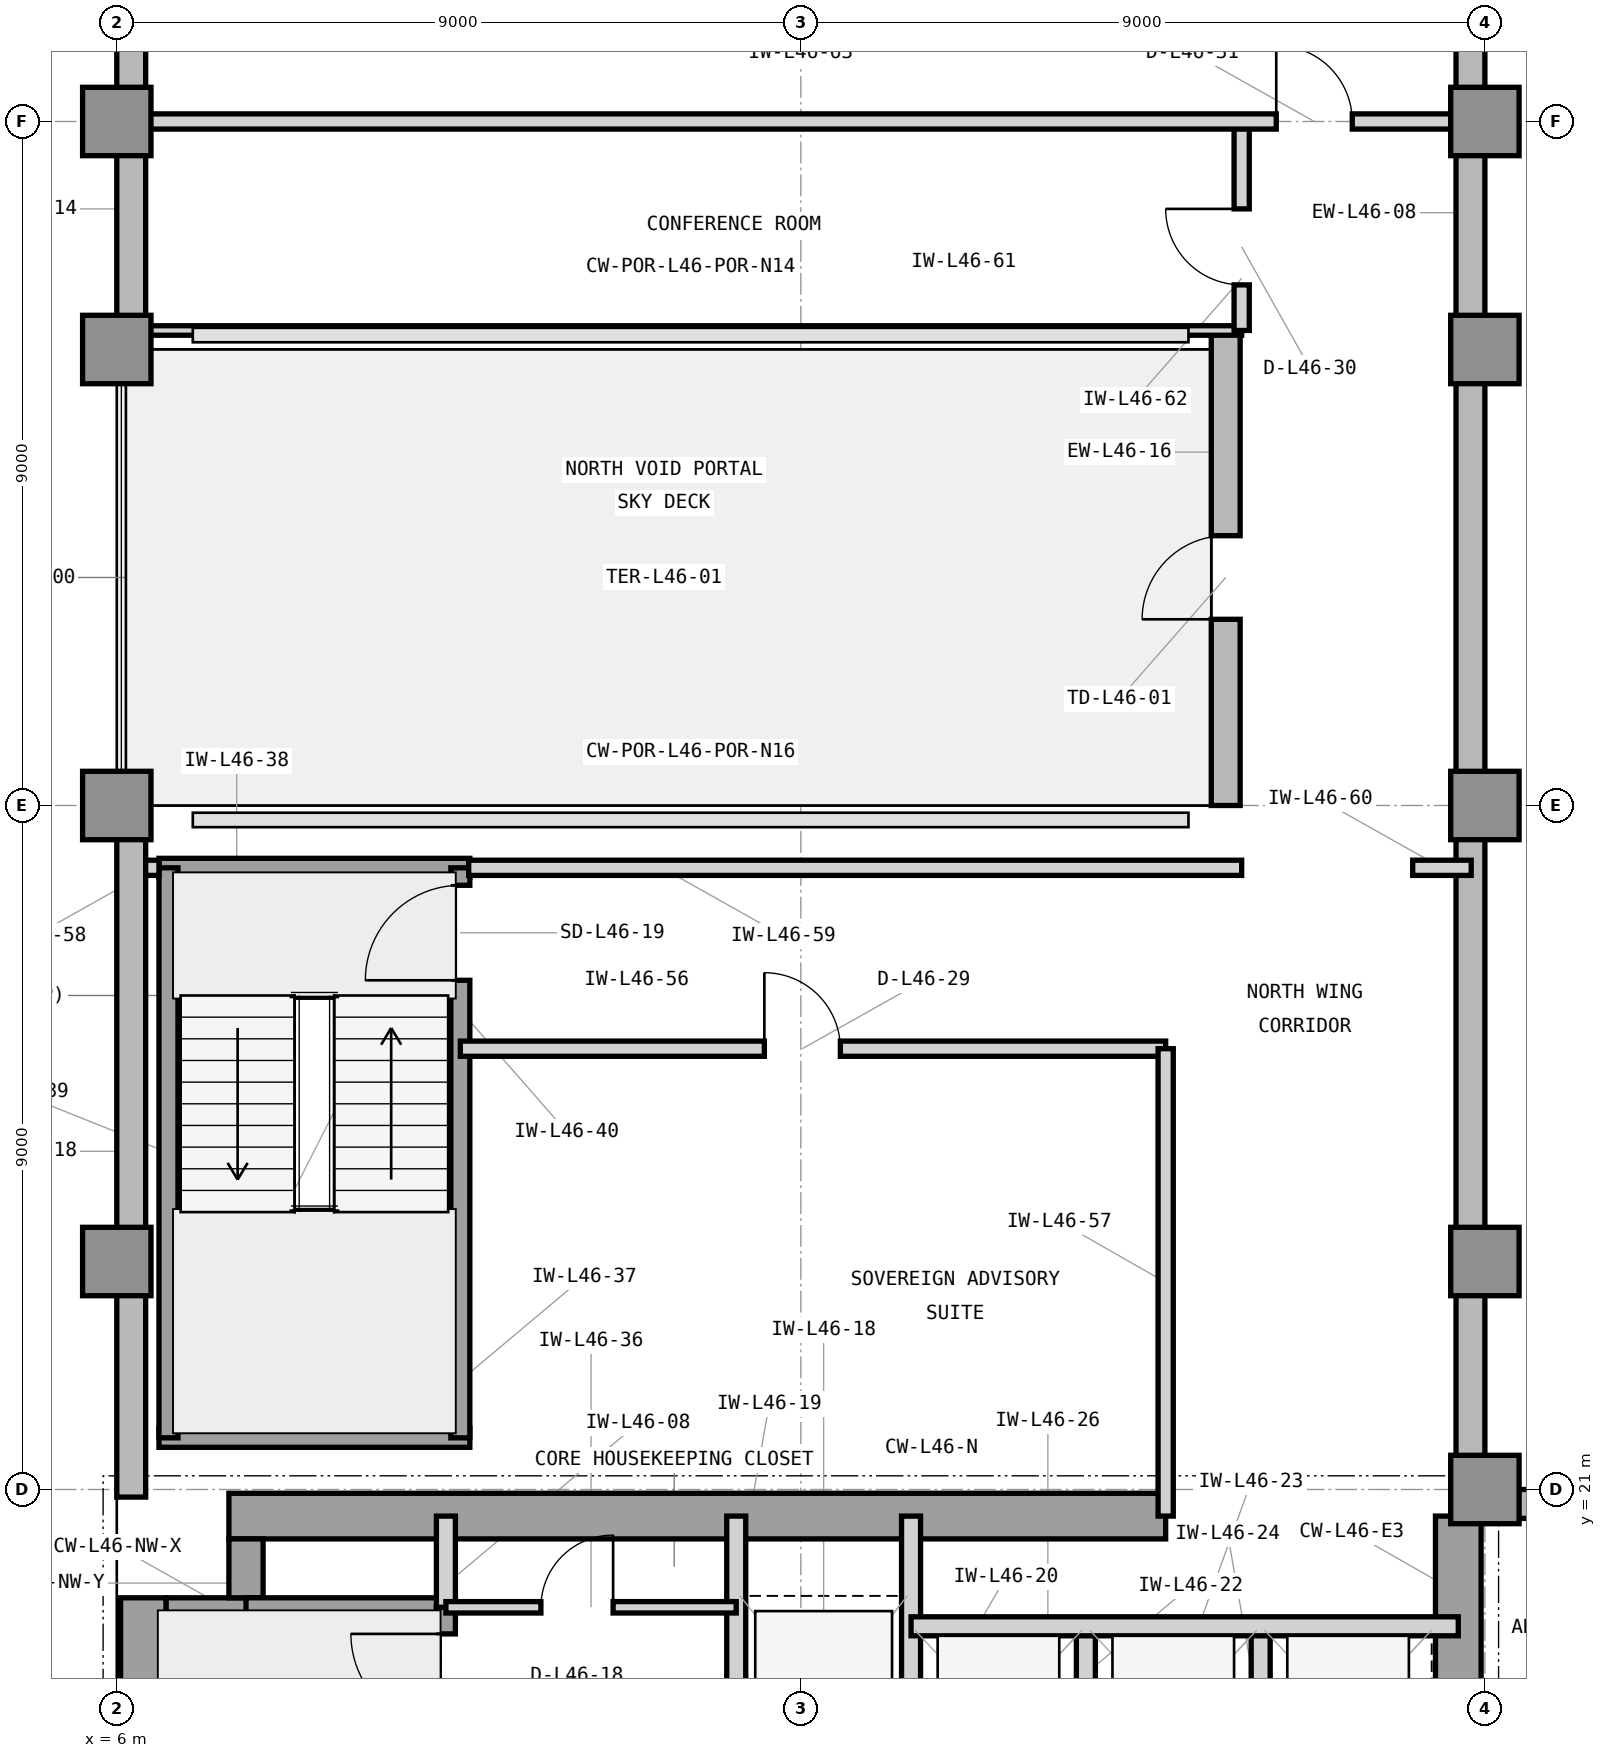
"""IFC4 building model, lengths in metres.
Left out: names, types, materials, properties, quantities, classifications, styles, units other than length and angle.
Written with IfcOpenShell. Run it as: python <this file> out.ifc"""

import sys

from ifc_helpers import new_model, si_unit, direction, frame, frame_2d, origin, origin_2d, place, context, subcontext, project, spatial, rectangle, extrude, element, fill, save


model = new_model("IFC4")
c1 = context("Model", 3, precision=1e-05, world=origin(), true_north=direction((0.0, 1.0)))
c2 = subcontext(c1, "Body", "Model", "MODEL_VIEW")
j1 = project(units=[si_unit("LENGTHUNIT", "METRE"), si_unit("PLANEANGLEUNIT", "RADIAN")], contexts=[c1])
p1 = place(None, origin())
s1 = spatial("IfcSite", under=j1, at=p1, CompositionType="ELEMENT")
p2 = place(p1, origin())
s2 = spatial("IfcBuilding", under=s1, at=p2, CompositionType="ELEMENT")
p3 = place(p2, frame((0.0, 0.0, 191.7)))
s3 = spatial("IfcBuildingStorey", under=s2, at=p3, CompositionType="ELEMENT", Elevation=191.7)
p4 = place(p3, frame((6.35, 4.425, 0.0), z_axis=(0.0, 0.0, 1.0), x_axis=(0.0, 1.0, 0.0)))
e1 = element("IfcWall", 1, at=p4, inside=s3, PredefinedType="SHEAR", context=c2, shape_type="SweptSolid", body=[
    extrude(rectangle(XDim=15.15, YDim=0.6, at=frame_2d((7.575, 0.0))), origin(), (0.0, 0.0, 1.0), 3.9),
])
p5 = place(p3, frame((7.475, 20.65, 0.0), z_axis=(0.0, 0.0, 1.0), x_axis=(1.0, 0.0, 0.0)))
e2 = element("IfcWall", 2, at=p5, inside=s3, PredefinedType="SHEAR", context=c2, shape_type="SweptSolid", body=[
    extrude(rectangle(XDim=12.325, YDim=0.6, at=frame_2d((6.163, 0.0))), origin(), (0.0, 0.0, 1.0), 3.9),
])
p6 = place(p3, frame((23.65, 16.6, 0.0), z_axis=(0.0, 0.0, 1.0), x_axis=(0.0, 1.0, 0.0)))
e3 = element("IfcWall", 3, at=p6, inside=s3, PredefinedType="SHEAR", context=c2, shape_type="SweptSolid", body=[
    extrude(rectangle(XDim=4.05, YDim=0.6, at=frame_2d((2.025, 0.0))), origin(), (0.0, 0.0, 1.0), 3.9),
])
p7 = place(p3, frame((6.65, 19.35, 0.0), z_axis=(0.0, 0.0, 1.0), x_axis=(1.0, 0.0, 0.0)))
e4 = element("IfcWall", 4, at=p7, inside=s3, PredefinedType="SHEAR", context=c2, shape_type="SweptSolid", body=[
    extrude(rectangle(XDim=1.275, YDim=0.45, at=frame_2d((0.638, 0.0))), origin(), (0.0, 0.0, 1.0), 3.9),
])
p8 = place(p3, frame((7.7, 19.575, 0.0), z_axis=(0.0, 0.0, 1.0), x_axis=(0.0, 1.0, 0.0)))
e5 = element("IfcWall", 5, at=p8, inside=s3, PredefinedType="SHEAR", context=c2, shape_type="SweptSolid", body=[
    extrude(rectangle(XDim=0.775, YDim=0.45, at=frame_2d((0.388, 0.0))), origin(), (0.0, 0.0, 1.0), 3.9),
])
for number, where, z_axis, x_axis in (
    (6, (24.0, 21.0, 0.0), (0.0, 0.0, 1.0), (1.0, 0.0, 0.0)),
    (7, (6.0, 24.0, 0.0), (0.0, 0.0, 1.0), (1.0, 0.0, 0.0)),
    (8, (24.0, 24.0, 0.0), (0.0, 0.0, 1.0), (1.0, 0.0, 0.0)),
    (9, (6.0, 30.0, 0.0), (0.0, 0.0, 1.0), (1.0, 0.0, 0.0)),
    (10, (24.0, 30.0, 0.0), (0.0, 0.0, 1.0), (1.0, 0.0, 0.0)),
    (11, (6.0, 36.0, 0.0), (0.0, 0.0, 1.0), (1.0, 0.0, 0.0)),
    (12, (24.0, 36.0, 0.0), (0.0, 0.0, 1.0), (1.0, 0.0, 0.0)),
    (13, (6.0, 39.0, 0.0), (0.0, 0.0, 1.0), (1.0, 0.0, 0.0)),
    (14, (24.0, 39.0, 0.0), (0.0, 0.0, 1.0), (1.0, 0.0, 0.0)),
):
    element("IfcColumn", number, at=place(p3, frame(where, z_axis=z_axis, x_axis=x_axis)), inside=s3, PredefinedType="COLUMN", context=c2, shape_type="SweptSolid", body=[
        extrude(rectangle(XDim=0.9, YDim=0.9, at=origin_2d()), origin(), (0.0, 0.0, 1.0), 3.9),
    ])
p9 = place(p3, frame((55.4, 20.81, 0.0), z_axis=(0.0, 0.0, 1.0), x_axis=(-1.0, 0.0, 0.0)))
e15 = element("IfcWall", 15, at=p9, inside=s3, PredefinedType="STANDARD", context=c2, shape_type="SweptSolid", body=[
    extrude(rectangle(XDim=31.4, YDim=0.38, at=frame_2d((15.7, 0.0))), origin(), (0.0, 0.0, 1.0), 3.7),
])
p10 = place(p9, frame((17.167, 0.0, 0.9)))
e16 = element("IfcOpeningElement", 16, at=p10, cuts=e15, PredefinedType="OPENING", context=c2, shape_type="SweptSolid", body=[
    extrude(rectangle(XDim=2.3, YDim=2.2, at=frame_2d((1.15, 1.1))), frame((0.0, 0.2, 0.0), z_axis=(0.0, -1.0, 0.0), x_axis=(1.0, 0.0, 0.0)), (0.0, 0.0, 1.0), 0.4),
])
p11 = place(p9, frame((29.034, 0.0, 0.9)))
e17 = element("IfcOpeningElement", 17, at=p11, cuts=e15, PredefinedType="OPENING", context=c2, shape_type="SweptSolid", body=[
    extrude(rectangle(XDim=1.6, YDim=2.2, at=frame_2d((0.8, 1.1))), frame((0.0, 0.2, 0.0), z_axis=(0.0, -1.0, 0.0), x_axis=(1.0, 0.0, 0.0)), (0.0, 0.0, 1.0), 0.4),
])
p12 = place(p9, frame((8.354, 0.0, 0.9)))
e18 = element("IfcOpeningElement", 18, at=p12, cuts=e15, PredefinedType="OPENING", context=c2, shape_type="SweptSolid", body=[
    extrude(rectangle(XDim=2.3, YDim=2.2, at=frame_2d((1.15, 1.1))), frame((0.0, 0.2, 0.0), z_axis=(0.0, -1.0, 0.0), x_axis=(1.0, 0.0, 0.0)), (0.0, 0.0, 1.0), 0.4),
])
p13 = place(p3, frame((23.81, 21.0, 0.0), z_axis=(0.0, 0.0, 1.0), x_axis=(0.0, 1.0, 0.0)))
e19 = element("IfcWall", 19, at=p13, inside=s3, PredefinedType="STANDARD", context=c2, shape_type="SweptSolid", body=[
    extrude(rectangle(XDim=22.4, YDim=0.38, at=frame_2d((11.2, 0.0))), origin(), (0.0, 0.0, 1.0), 3.7),
])
p14 = place(p3, frame((6.19, 43.4, 0.0), z_axis=(0.0, 0.0, 1.0), x_axis=(0.0, -1.0, 0.0)))
e20 = element("IfcWall", 20, at=p14, inside=s3, PredefinedType="STANDARD", context=c2, shape_type="SweptSolid", body=[
    extrude(rectangle(XDim=7.4, YDim=0.38, at=frame_2d((3.7, 0.0))), origin(), (0.0, 0.0, 1.0), 3.7),
])
p15 = place(p3, frame((20.59, 36.2, 0.0), z_axis=(0.0, 0.0, 1.0), x_axis=(0.0, -1.0, 0.0)))
e21 = element("IfcWall", 21, at=p15, inside=s3, PredefinedType="STANDARD", context=c2, shape_type="SweptSolid", body=[
    extrude(rectangle(XDim=6.2, YDim=0.38, at=frame_2d((3.1, 0.0))), origin(), (0.0, 0.0, 1.0), 3.7),
])
p16 = place(p15, frame((2.65, 0.0, 0.0)))
e22 = element("IfcOpeningElement", 22, at=p16, cuts=e21, PredefinedType="OPENING", context=c2, shape_type="SweptSolid", body=[
    extrude(rectangle(XDim=1.1, YDim=2.3, at=frame_2d((0.55, 1.15))), frame((0.0, 0.2, 0.0), z_axis=(0.0, -1.0, 0.0), x_axis=(1.0, 0.0, 0.0)), (0.0, 0.0, 1.0), 0.4),
])
p17 = place(p3, frame((6.19, 30.0, 0.0), z_axis=(0.0, 0.0, 1.0), x_axis=(0.0, -1.0, 0.0)))
e23 = element("IfcWall", 23, at=p17, inside=s3, PredefinedType="STANDARD", context=c2, shape_type="SweptSolid", body=[
    extrude(rectangle(XDim=9.1, YDim=0.38, at=frame_2d((4.55, 0.0))), origin(), (0.0, 0.0, 1.0), 3.7),
])
p18 = place(p3, frame((7.7, 19.45, 0.0), z_axis=(0.0, 0.0, 1.0), x_axis=(1.0, 0.0, 0.0)))
e24 = element("IfcWall", 24, at=p18, inside=s3, PredefinedType="SHEAR", context=c2, shape_type="SweptSolid", body=[
    extrude(rectangle(XDim=2.755, YDim=0.25, at=frame_2d((1.377, 0.0))), origin(), (0.0, 0.0, 1.0), 3.9),
])
p19 = place(p3, frame((10.33, 12.0, 0.0), z_axis=(0.0, 0.0, 1.0), x_axis=(0.0, 1.0, 0.0)))
e25 = element("IfcWall", 25, at=p19, inside=s3, PredefinedType="SHEAR", context=c2, shape_type="SweptSolid", body=[
    extrude(rectangle(XDim=7.45, YDim=0.25, at=frame_2d((3.725, 0.0))), origin(), (0.0, 0.0, 1.0), 3.9),
])
p20 = place(p19, frame((5.85, 0.0, 0.0)))
e26 = element("IfcOpeningElement", 26, at=p20, cuts=e25, PredefinedType="OPENING", context=c2, shape_type="SweptSolid", body=[
    extrude(rectangle(XDim=1.25, YDim=2.2, at=frame_2d((0.625, 1.1))), frame((0.0, 0.135, 0.0), z_axis=(0.0, -1.0, 0.0), x_axis=(1.0, 0.0, 0.0)), (0.0, 0.0, 1.0), 0.27),
])
p21 = place(p3, frame((10.33, 19.45, 0.0), z_axis=(0.0, 0.0, 1.0), x_axis=(0.0, 1.0, 0.0)))
e27 = element("IfcWall", 27, at=p21, inside=s3, PredefinedType="PARTITIONING", context=c2, shape_type="SweptSolid", body=[
    extrude(rectangle(XDim=1.2, YDim=0.25, at=frame_2d((0.6, 0.0))), origin(), (0.0, 0.0, 1.0), 3.073),
])
for number, where, z_axis, x_axis in (
    (28, (14.15, 16.7, 0.0), (0.0, 0.0, 1.0), (0.0, 1.0, 0.0)),
    (29, (16.45, 16.7, 0.0), (0.0, 0.0, 1.0), (0.0, 1.0, 0.0)),
):
    element("IfcWall", number, at=place(p3, frame(where, z_axis=z_axis, x_axis=x_axis)), inside=s3, PredefinedType="PARTITIONING", context=c2, shape_type="SweptSolid", body=[
        extrude(rectangle(XDim=3.95, YDim=0.25, at=frame_2d((1.975, 0.0))), origin(), (0.0, 0.0, 1.0), 3.69),
    ])
for number, where, z_axis, x_axis in (
    (30, (18.75, 16.7, 0.0), (0.0, 0.0, 1.0), (0.0, 1.0, 0.0)),
    (31, (21.05, 16.7, 0.0), (0.0, 0.0, 1.0), (0.0, 1.0, 0.0)),
):
    element("IfcWall", number, at=place(p3, frame(where, z_axis=z_axis, x_axis=x_axis)), inside=s3, PredefinedType="PARTITIONING", context=c2, shape_type="SweptSolid", body=[
        extrude(rectangle(XDim=2.5, YDim=0.25, at=frame_2d((1.25, 0.0))), origin(), (0.0, 0.0, 1.0), 3.69),
    ])
p22 = place(p3, frame((16.45, 19.2, 0.0), z_axis=(0.0, 0.0, 1.0), x_axis=(1.0, 0.0, 0.0)))
e32 = element("IfcWall", 32, at=p22, inside=s3, PredefinedType="PARTITIONING", context=c2, shape_type="SweptSolid", body=[
    extrude(rectangle(XDim=7.2, YDim=0.25, at=frame_2d((3.6, 0.0))), origin(), (0.0, 0.0, 1.0), 3.69),
])
p23 = place(p3, frame((10.33, 19.45, 0.0), z_axis=(0.0, 0.0, 1.0), x_axis=(1.0, 0.0, 0.0)))
e33 = element("IfcWall", 33, at=p23, inside=s3, PredefinedType="PARTITIONING", context=c2, shape_type="SweptSolid", body=[
    extrude(rectangle(XDim=3.82, YDim=0.15, at=frame_2d((1.91, 0.0))), origin(), (0.0, 0.0, 1.0), 3.69),
])
p24 = place(p23, frame((1.25, 0.0, 0.0)))
e34 = element("IfcOpeningElement", 34, at=p24, cuts=e33, PredefinedType="OPENING", context=c2, shape_type="SweptSolid", body=[
    extrude(rectangle(XDim=0.95, YDim=2.1, at=frame_2d((0.475, 1.05))), frame((0.0, 0.085, 0.0), z_axis=(0.0, -1.0, 0.0), x_axis=(1.0, 0.0, 0.0)), (0.0, 0.0, 1.0), 0.17),
])
for number, where, z_axis, x_axis in (
    (35, (6.555, 21.68, 0.0), (0.0, 0.0, 1.0), (1.0, 0.0, 0.0)),
    (36, (6.555, 29.18, 0.0), (0.0, 0.0, 1.0), (1.0, 0.0, 0.0)),
):
    element("IfcWall", number, at=place(p3, frame(where, z_axis=z_axis, x_axis=x_axis)), inside=s3, PredefinedType="SHEAR", context=c2, shape_type="SweptSolid", body=[
        extrude(rectangle(XDim=4.09, YDim=0.25, at=frame_2d((2.045, 0.0))), origin(), (0.0, 0.0, 1.0), 3.9),
    ])
p25 = place(p3, frame((6.68, 21.68, 0.0), z_axis=(0.0, 0.0, 1.0), x_axis=(0.0, 1.0, 0.0)))
e37 = element("IfcWall", 37, at=p25, inside=s3, PredefinedType="SHEAR", context=c2, shape_type="SweptSolid", body=[
    extrude(rectangle(XDim=7.5, YDim=0.25, at=frame_2d((3.75, 0.0))), origin(), (0.0, 0.0, 1.0), 3.9),
])
p26 = place(p3, frame((10.52, 21.68, 0.0), z_axis=(0.0, 0.0, 1.0), x_axis=(0.0, 1.0, 0.0)))
e38 = element("IfcWall", 38, at=p26, inside=s3, PredefinedType="SHEAR", context=c2, shape_type="SweptSolid", body=[
    extrude(rectangle(XDim=7.5, YDim=0.25, at=frame_2d((3.75, 0.0))), origin(), (0.0, 0.0, 1.0), 3.9),
])
p27 = place(p26, frame((6.02, 0.0, 0.0)))
e39 = element("IfcOpeningElement", 39, at=p27, cuts=e38, PredefinedType="OPENING", context=c2, shape_type="SweptSolid", body=[
    extrude(rectangle(XDim=1.25, YDim=2.2, at=frame_2d((0.625, 1.1))), frame((0.0, 0.135, 0.0), z_axis=(0.0, -1.0, 0.0), x_axis=(1.0, 0.0, 0.0)), (0.0, 0.0, 1.0), 0.27),
])
p28 = place(p3, frame((10.52, 26.8, 0.0), z_axis=(0.0, 0.0, 1.0), x_axis=(1.0, 0.0, 0.0)))
e40 = element("IfcWall", 40, at=p28, inside=s3, PredefinedType="PARTITIONING", context=c2, shape_type="SweptSolid", body=[
    extrude(rectangle(XDim=9.28, YDim=0.2, at=frame_2d((4.64, 0.0))), origin(), (0.0, 0.0, 1.0), 3.69),
])
p29 = place(p28, frame((4.0, 0.0, 0.0)))
e41 = element("IfcOpeningElement", 41, at=p29, cuts=e40, PredefinedType="OPENING", context=c2, shape_type="SweptSolid", body=[
    extrude(rectangle(XDim=1.0, YDim=2.15, at=frame_2d((0.5, 1.075))), frame((0.0, 0.11, 0.0), z_axis=(0.0, -1.0, 0.0), x_axis=(1.0, 0.0, 0.0)), (0.0, 0.0, 1.0), 0.22),
])
p30 = place(p3, frame((19.8, 20.65, 0.0), z_axis=(0.0, 0.0, 1.0), x_axis=(0.0, 1.0, 0.0)))
e42 = element("IfcWall", 42, at=p30, inside=s3, PredefinedType="PARTITIONING", context=c2, shape_type="SweptSolid", body=[
    extrude(rectangle(XDim=6.15, YDim=0.2, at=frame_2d((3.075, 0.0))), origin(), (0.0, 0.0, 1.0), 3.69),
])
p31 = place(p3, frame((6.38, 29.18, 0.0), z_axis=(0.0, 0.0, 1.0), x_axis=(1.0, 0.0, 0.0)))
e43 = element("IfcWall", 43, at=p31, inside=s3, PredefinedType="PARTITIONING", context=c2, shape_type="SweptSolid", body=[
    extrude(rectangle(XDim=0.175, YDim=0.2, at=frame_2d((0.087, 0.0))), origin(), (0.0, 0.0, 1.0), 3.69),
])
p32 = place(p3, frame((10.63, 29.18, 0.0), z_axis=(0.0, 0.0, 1.0), x_axis=(1.0, 0.0, 0.0)))
e44 = element("IfcWall", 44, at=p32, inside=s3, PredefinedType="PARTITIONING", context=c2, shape_type="SweptSolid", body=[
    extrude(rectangle(XDim=10.17, YDim=0.2, at=frame_2d((5.085, 0.0))), origin(), (0.0, 0.0, 1.0), 3.69),
])
p33 = place(p3, frame((23.05, 29.18, 0.0), z_axis=(0.0, 0.0, 1.0), x_axis=(1.0, 0.0, 0.0)))
e45 = element("IfcWall", 45, at=p33, inside=s3, PredefinedType="PARTITIONING", context=c2, shape_type="SweptSolid", body=[
    extrude(rectangle(XDim=0.77, YDim=0.2, at=frame_2d((0.385, 0.0))), origin(), (0.0, 0.0, 1.0), 3.69),
])
p34 = place(p3, frame((6.18, 36.25, 0.0), z_axis=(0.0, 0.0, 1.0), x_axis=(1.0, 0.0, 0.0)))
e46 = element("IfcWall", 46, at=p34, inside=s3, PredefinedType="PARTITIONING", context=c2, shape_type="SweptSolid", body=[
    extrude(rectangle(XDim=14.62, YDim=0.125, at=frame_2d((7.31, 0.0))), origin(), (0.0, 0.0, 1.0), 3.69),
])
p35 = place(p3, frame((20.8, 36.25, 0.0), z_axis=(0.0, 0.0, 1.0), x_axis=(0.0, 1.0, 0.0)))
e47 = element("IfcWall", 47, at=p35, inside=s3, PredefinedType="PARTITIONING", context=c2, shape_type="SweptSolid", body=[
    extrude(rectangle(XDim=2.75, YDim=0.2, at=frame_2d((1.375, 0.0))), origin(), (0.0, 0.0, 1.0), 3.69),
])
p36 = place(p35, frame((0.6, 0.0, 0.0)))
e48 = element("IfcOpeningElement", 48, at=p36, cuts=e47, PredefinedType="OPENING", context=c2, shape_type="SweptSolid", body=[
    extrude(rectangle(XDim=1.0, YDim=2.15, at=frame_2d((0.5, 1.075))), frame((0.0, 0.11, 0.0), z_axis=(0.0, -1.0, 0.0), x_axis=(1.0, 0.0, 0.0)), (0.0, 0.0, 1.0), 0.22),
])
p37 = place(p3, frame((6.18, 39.0, 0.0), z_axis=(0.0, 0.0, 1.0), x_axis=(1.0, 0.0, 0.0)))
e49 = element("IfcWall", 49, at=p37, inside=s3, PredefinedType="PARTITIONING", context=c2, shape_type="SweptSolid", body=[
    extrude(rectangle(XDim=17.64, YDim=0.2, at=frame_2d((8.82, 0.0))), origin(), (0.0, 0.0, 1.0), 3.073),
])
p38 = place(p37, frame((15.075, 0.0, 0.0)))
e50 = element("IfcOpeningElement", 50, at=p38, cuts=e49, PredefinedType="OPENING", context=c2, shape_type="SweptSolid", body=[
    extrude(rectangle(XDim=1.0, YDim=2.15, at=frame_2d((0.5, 1.075))), frame((0.0, 0.11, 0.0), z_axis=(0.0, -1.0, 0.0), x_axis=(1.0, 0.0, 0.0)), (0.0, 0.0, 1.0), 0.22),
])
p39 = place(p16, frame((1.1, 0.0, 0.0), z_axis=(0.0, 0.0, 1.0), x_axis=(-1.0, 0.0, 0.0)))
e51 = element("IfcDoor", 51, at=p39, inside=s3, OperationType="SINGLE_SWING_LEFT", PredefinedType="DOOR", context=c2, shape_type="SweptSolid", body=[
    extrude(rectangle(XDim=1.1, YDim=2.3, at=frame_2d((0.55, 1.15))), frame((0.0, 0.025, 0.0), z_axis=(0.0, -1.0, 0.0), x_axis=(1.0, 0.0, 0.0)), (0.0, 0.0, 1.0), 0.05),
])
fill(e22, e51)
p40 = place(p20, origin())
e52 = element("IfcDoor", 52, at=p40, inside=s3, OperationType="SINGLE_SWING_RIGHT", PredefinedType="DOOR", context=c2, shape_type="SweptSolid", body=[
    extrude(rectangle(XDim=1.25, YDim=2.2, at=frame_2d((0.625, 1.1))), frame((0.0, 0.025, 0.0), z_axis=(0.0, -1.0, 0.0), x_axis=(1.0, 0.0, 0.0)), (0.0, 0.0, 1.0), 0.05),
])
fill(e26, e52)
p41 = place(p24, origin())
e53 = element("IfcDoor", 53, at=p41, inside=s3, OperationType="SINGLE_SWING_RIGHT", PredefinedType="DOOR", context=c2, shape_type="SweptSolid", body=[
    extrude(rectangle(XDim=0.95, YDim=2.1, at=frame_2d((0.475, 1.05))), frame((0.0, 0.025, 0.0), z_axis=(0.0, -1.0, 0.0), x_axis=(1.0, 0.0, 0.0)), (0.0, 0.0, 1.0), 0.05),
])
fill(e34, e53)
p42 = place(p27, origin())
e54 = element("IfcDoor", 54, at=p42, inside=s3, OperationType="SINGLE_SWING_LEFT", PredefinedType="DOOR", context=c2, shape_type="SweptSolid", body=[
    extrude(rectangle(XDim=1.25, YDim=2.2, at=frame_2d((0.625, 1.1))), frame((0.0, 0.025, 0.0), z_axis=(0.0, -1.0, 0.0), x_axis=(1.0, 0.0, 0.0)), (0.0, 0.0, 1.0), 0.05),
])
fill(e39, e54)
p43 = place(p29, origin())
e55 = element("IfcDoor", 55, at=p43, inside=s3, OperationType="SINGLE_SWING_LEFT", PredefinedType="DOOR", context=c2, shape_type="SweptSolid", body=[
    extrude(rectangle(XDim=1.0, YDim=2.15, at=frame_2d((0.5, 1.075))), frame((0.0, 0.025, 0.0), z_axis=(0.0, -1.0, 0.0), x_axis=(1.0, 0.0, 0.0)), (0.0, 0.0, 1.0), 0.05),
])
fill(e41, e55)
p44 = place(p36, origin())
e56 = element("IfcDoor", 56, at=p44, inside=s3, OperationType="SINGLE_SWING_RIGHT", PredefinedType="DOOR", context=c2, shape_type="SweptSolid", body=[
    extrude(rectangle(XDim=1.0, YDim=2.15, at=frame_2d((0.5, 1.075))), frame((0.0, 0.025, 0.0), z_axis=(0.0, -1.0, 0.0), x_axis=(1.0, 0.0, 0.0)), (0.0, 0.0, 1.0), 0.05),
])
fill(e48, e56)
p45 = place(p38, origin())
e57 = element("IfcDoor", 57, at=p45, inside=s3, OperationType="SINGLE_SWING_LEFT", PredefinedType="DOOR", context=c2, shape_type="SweptSolid", body=[
    extrude(rectangle(XDim=1.0, YDim=2.15, at=frame_2d((0.5, 1.075))), frame((0.0, 0.025, 0.0), z_axis=(0.0, -1.0, 0.0), x_axis=(1.0, 0.0, 0.0)), (0.0, 0.0, 1.0), 0.05),
])
fill(e50, e57)
save(model, sys.argv[1])
